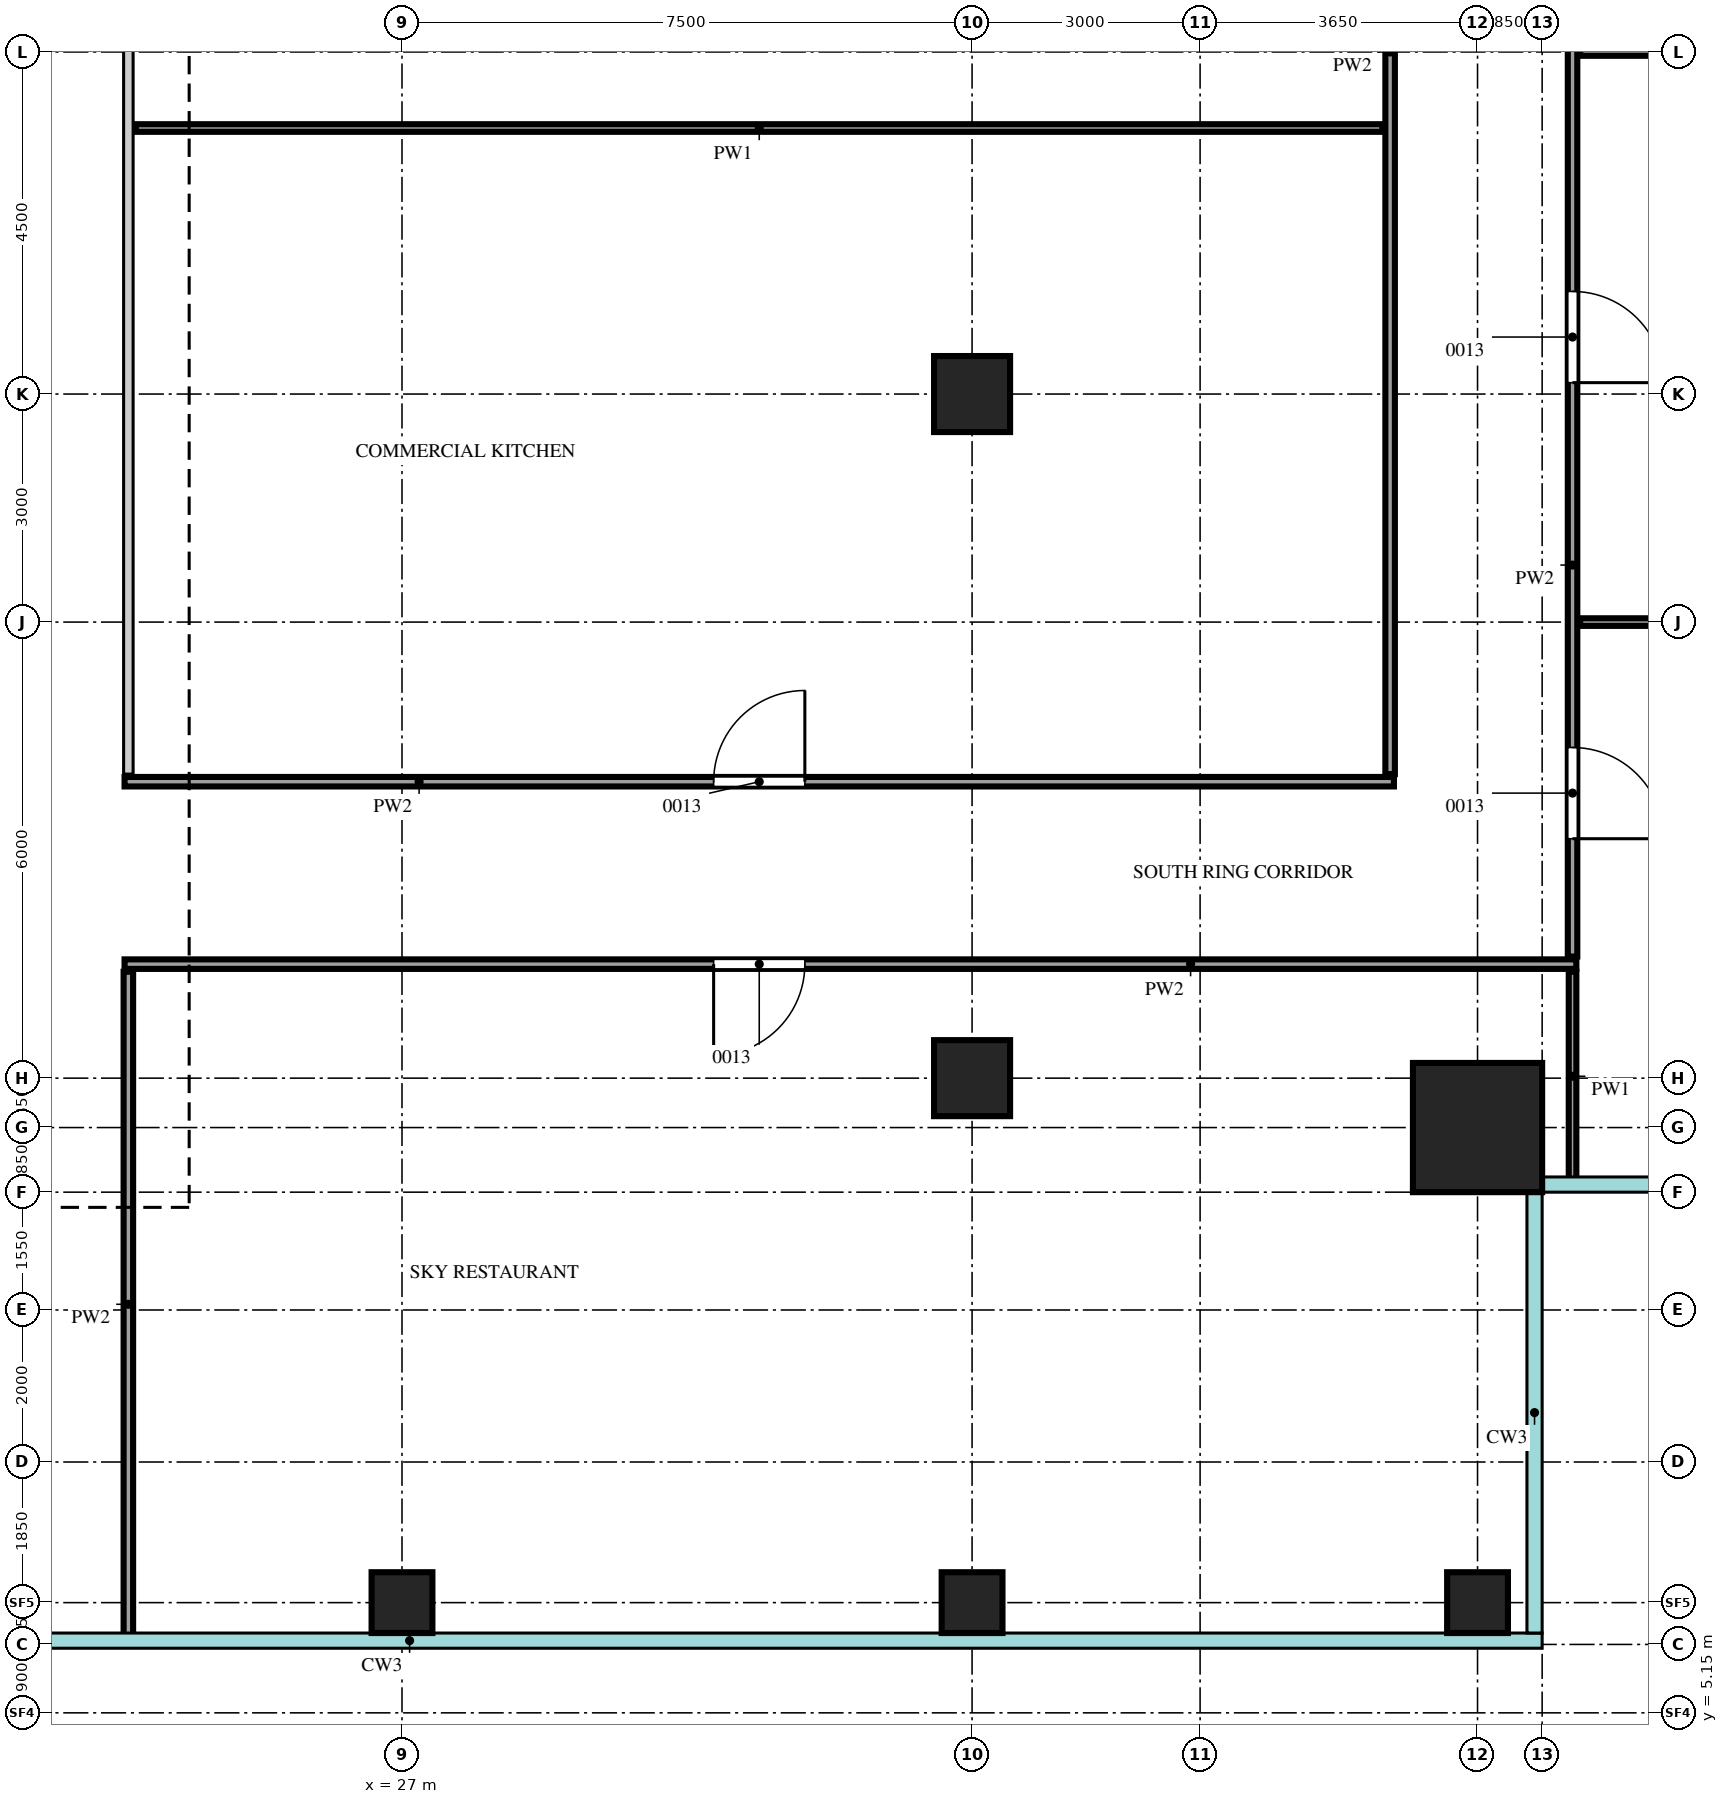
"""IFC4 building model, lengths in metres.
Left out: names, types, materials, properties, quantities, classifications, styles, units other than length and angle.
Written with IfcOpenShell. Run it as: python <this file> out.ifc"""

import sys

from ifc_helpers import new_model, si_unit, direction, frame, frame_2d, origin, origin_2d, place, context, subcontext, project, spatial, rectangle, extrude, source, transform, mapped, element, fill, save


model = new_model("IFC4")
c1 = context("Model", 3, precision=1e-05, world=origin(), true_north=direction((0.0, 1.0)))
c2 = subcontext(c1, "Body", "Model", "MODEL_VIEW")
j1 = project(units=[si_unit("LENGTHUNIT", "METRE"), si_unit("PLANEANGLEUNIT", "RADIAN")], contexts=[c1])
p1 = place(None, origin())
s1 = spatial("IfcSite", under=j1, at=p1, CompositionType="ELEMENT")
p2 = place(p1, origin())
s2 = spatial("IfcBuilding", under=s1, at=p2, CompositionType="ELEMENT")
p3 = place(p2, frame((0.0, 0.0, 314.2)))
s3 = spatial("IfcBuildingStorey", under=s2, at=p3, CompositionType="ELEMENT", Elevation=314.2)
m1 = source(origin(), c2, "Body", "SweptSolid", [
    extrude(rectangle(XDim=1.7, YDim=1.7, at=origin_2d()), origin(), (0.0, 0.0, 1.0), 3.75),
])
p4 = place(p3, frame((41.15, 12.85, 0.0), z_axis=(0.0, 0.0, 1.0), x_axis=(1.0, 0.0, 0.0)))
e1 = element("IfcColumn", 1, at=p4, inside=s3, PredefinedType="COLUMN", context=c2, shape_type="MappedRepresentation", body=[
    mapped(m1, transform((0.0, 0.0, 0.0))),
])
m2 = source(origin(), c2, "Body", "SweptSolid", [
    extrude(rectangle(XDim=0.8, YDim=0.8, at=origin_2d()), origin(), (0.0, 0.0, 1.0), 3.75),
])
for number, where, z_axis, x_axis in (
    (2, (27.0, 6.6, 0.0), (0.0, 0.0, 1.0), (1.0, 0.0, 0.0)),
    (3, (34.5, 6.6, 0.0), (0.0, 0.0, 1.0), (1.0, 0.0, 0.0)),
    (4, (41.15, 6.6, 0.0), (0.0, 0.0, 1.0), (1.0, 0.0, 0.0)),
):
    element("IfcColumn", number, at=place(p3, frame(where, z_axis=z_axis, x_axis=x_axis)), inside=s3, PredefinedType="COLUMN", context=c2, shape_type="MappedRepresentation", body=[
        mapped(m2, transform((0.0, 0.0, 0.0))),
    ])
m3 = source(origin(), c2, "Body", "SweptSolid", [
    extrude(rectangle(XDim=1.0, YDim=1.0, at=origin_2d()), origin(), (0.0, 0.0, 1.0), 3.75),
])
for number, where, z_axis, x_axis in (
    (5, (34.5, 13.5, 0.0), (0.0, 0.0, 1.0), (1.0, 0.0, 0.0)),
    (6, (34.5, 22.5, 0.0), (0.0, 0.0, 1.0), (1.0, 0.0, 0.0)),
):
    element("IfcColumn", number, at=place(p3, frame(where, z_axis=z_axis, x_axis=x_axis)), inside=s3, PredefinedType="COLUMN", context=c2, shape_type="MappedRepresentation", body=[
        mapped(m3, transform((0.0, 0.0, 0.0))),
    ])
m4 = source(origin(), c2, "Body", "SweptSolid", [
    extrude(rectangle(XDim=8.75, YDim=0.125, at=frame_2d((4.375, 0.0))), origin(), (0.0, 0.0, 1.0), 3.8),
])
p5 = place(p3, frame((23.4, 6.15, 0.0), z_axis=(0.0, 0.0, 1.0), x_axis=(0.0, 1.0, 0.0)))
e7 = element("IfcWall", 7, at=p5, inside=s3, PredefinedType="PARTITIONING", context=c2, shape_type="MappedRepresentation", body=[
    mapped(m4, transform((0.0, 0.0, 0.0))),
])
m5 = source(origin(), c2, "Body", "SweptSolid", [
    extrude(rectangle(XDim=2.75, YDim=0.1, at=frame_2d((1.375, 0.0))), origin(), (0.0, 0.0, 1.0), 3.8),
])
p6 = place(p3, frame((42.4, 12.15, 0.0), z_axis=(0.0, 0.0, 1.0), x_axis=(0.0, 1.0, 0.0)))
e8 = element("IfcWall", 8, at=p6, inside=s3, PredefinedType="PARTITIONING", context=c2, shape_type="MappedRepresentation", body=[
    mapped(m5, transform((0.0, 0.0, 0.0))),
])
m6 = source(origin(), c2, "Body", "SweptSolid", [
    extrude(rectangle(XDim=19.1, YDim=0.125, at=frame_2d((9.55, 0.0))), origin(), (0.0, 0.0, 1.0), 3.8),
])
p7 = place(p3, frame((23.35, 15.0, 0.0), z_axis=(0.0, 0.0, 1.0), x_axis=(1.0, 0.0, 0.0)))
e9 = element("IfcWall", 9, at=p7, inside=s3, PredefinedType="PARTITIONING", context=c2, shape_type="MappedRepresentation", body=[
    mapped(m6, transform((0.0, 0.0, 0.0))),
])
m7 = source(origin(), c2, "Body", "SweptSolid", [
    extrude(rectangle(XDim=1.2, YDim=2.1, at=frame_2d((0.6, 1.05))), frame((0.0, 0.073, 0.0), z_axis=(0.0, -1.0, 0.0), x_axis=(1.0, 0.0, 0.0)), (0.0, 0.0, 1.0), 0.145),
])
p8 = place(p7, frame((7.75, 0.0, 0.0)))
e10 = element("IfcOpeningElement", 10, at=p8, cuts=e9, PredefinedType="OPENING", context=c2, shape_type="MappedRepresentation", body=[
    mapped(m7, transform((0.0, 0.0, 0.0))),
])
m8 = source(origin(), c2, "Body", "SweptSolid", [
    extrude(rectangle(XDim=23.8, YDim=0.125, at=frame_2d((11.9, 0.0))), origin(), (0.0, 0.0, 1.0), 3.8),
])
p9 = place(p3, frame((42.4, 15.1, 0.0), z_axis=(0.0, 0.0, 1.0), x_axis=(0.0, 1.0, 0.0)))
e11 = element("IfcWall", 11, at=p9, inside=s3, PredefinedType="PARTITIONING", context=c2, shape_type="MappedRepresentation", body=[
    mapped(m8, transform((0.0, 0.0, 0.0))),
])
p10 = place(p9, frame((1.55, 0.0, 0.0)))
e12 = element("IfcOpeningElement", 12, at=p10, cuts=e11, PredefinedType="OPENING", context=c2, shape_type="MappedRepresentation", body=[
    mapped(m7, transform((0.0, 0.0, 0.0))),
])
p11 = place(p9, frame((7.55, 0.0, 0.0)))
e13 = element("IfcOpeningElement", 13, at=p11, cuts=e11, PredefinedType="OPENING", context=c2, shape_type="MappedRepresentation", body=[
    mapped(m7, transform((0.0, 0.0, 0.0))),
])
m9 = source(origin(), c2, "Body", "SweptSolid", [
    extrude(rectangle(XDim=0.9, YDim=2.1, at=frame_2d((0.45, 1.05))), frame((0.0, 0.073, 0.0), z_axis=(0.0, -1.0, 0.0), x_axis=(1.0, 0.0, 0.0)), (0.0, 0.0, 1.0), 0.145),
])
p12 = place(p9, frame((13.3, 0.0, 0.0)))
e14 = element("IfcOpeningElement", 14, at=p12, cuts=e11, PredefinedType="OPENING", context=c2, shape_type="MappedRepresentation", body=[
    mapped(m9, transform((0.0, 0.0, 0.0))),
])
p13 = place(p9, frame((17.35, 0.0, 0.0)))
e15 = element("IfcOpeningElement", 15, at=p13, cuts=e11, PredefinedType="OPENING", context=c2, shape_type="MappedRepresentation", body=[
    mapped(m9, transform((0.0, 0.0, 0.0))),
])
m10 = source(origin(), c2, "Body", "SweptSolid", [
    extrude(rectangle(XDim=1.0, YDim=2.1, at=frame_2d((0.5, 1.05))), frame((0.0, 0.073, 0.0), z_axis=(0.0, -1.0, 0.0), x_axis=(1.0, 0.0, 0.0)), (0.0, 0.0, 1.0), 0.145),
])
p14 = place(p9, frame((21.15, 0.0, 0.0)))
e16 = element("IfcOpeningElement", 16, at=p14, cuts=e11, PredefinedType="OPENING", context=c2, shape_type="MappedRepresentation", body=[
    mapped(m10, transform((0.0, 0.0, 0.0))),
])
m11 = source(origin(), c2, "Body", "SweptSolid", [
    extrude(rectangle(XDim=16.7, YDim=0.125, at=frame_2d((8.35, 0.0))), origin(), (0.0, 0.0, 1.0), 3.8),
])
p15 = place(p3, frame((23.35, 17.4, 0.0), z_axis=(0.0, 0.0, 1.0), x_axis=(1.0, 0.0, 0.0)))
e17 = element("IfcWall", 17, at=p15, inside=s3, PredefinedType="PARTITIONING", context=c2, shape_type="MappedRepresentation", body=[
    mapped(m11, transform((0.0, 0.0, 0.0))),
])
p16 = place(p15, frame((7.75, 0.0, 0.0)))
e18 = element("IfcOpeningElement", 18, at=p16, cuts=e17, PredefinedType="OPENING", context=c2, shape_type="MappedRepresentation", body=[
    mapped(m7, transform((0.0, 0.0, 0.0))),
])
m12 = source(origin(), c2, "Body", "SweptSolid", [
    extrude(rectangle(XDim=19.0, YDim=0.125, at=frame_2d((9.5, 0.0))), origin(), (0.0, 0.0, 1.0), 3.8),
])
p17 = place(p3, frame((23.4, 17.5, 0.0), z_axis=(0.0, 0.0, 1.0), x_axis=(0.0, 1.0, 0.0)))
e19 = element("IfcWall", 19, at=p17, inside=s3, PredefinedType="PARTITIONING", context=c2, shape_type="MappedRepresentation", body=[
    mapped(m12, transform((0.0, 0.0, 0.0))),
])
p18 = place(p17, frame((10.4, 0.0, 0.0)))
e20 = element("IfcOpeningElement", 20, at=p18, cuts=e19, PredefinedType="OPENING", context=c2, shape_type="MappedRepresentation", body=[
    mapped(m9, transform((0.0, 0.0, 0.0))),
])
p19 = place(p3, frame((40.0, 17.5, 0.0), z_axis=(0.0, 0.0, 1.0), x_axis=(0.0, 1.0, 0.0)))
e21 = element("IfcWall", 21, at=p19, inside=s3, PredefinedType="PARTITIONING", context=c2, shape_type="MappedRepresentation", body=[
    mapped(m12, transform((0.0, 0.0, 0.0))),
])
m13 = source(origin(), c2, "Body", "SweptSolid", [
    extrude(rectangle(XDim=5.35, YDim=0.1, at=frame_2d((2.675, 0.0))), origin(), (0.0, 0.0, 1.0), 3.8),
])
p20 = place(p3, frame((42.5, 19.5, 0.0), z_axis=(0.0, 0.0, 1.0), x_axis=(1.0, 0.0, 0.0)))
e22 = element("IfcWall", 22, at=p20, inside=s3, PredefinedType="PARTITIONING", context=c2, shape_type="MappedRepresentation", body=[
    mapped(m13, transform((0.0, 0.0, 0.0))),
])
m14 = source(origin(), c2, "Body", "SweptSolid", [
    extrude(rectangle(XDim=16.4, YDim=0.1, at=frame_2d((8.2, 0.0))), origin(), (0.0, 0.0, 1.0), 3.8),
])
p21 = place(p3, frame((23.5, 26.0, 0.0), z_axis=(0.0, 0.0, 1.0), x_axis=(1.0, 0.0, 0.0)))
e23 = element("IfcWall", 23, at=p21, inside=s3, PredefinedType="PARTITIONING", context=c2, shape_type="MappedRepresentation", body=[
    mapped(m14, transform((0.0, 0.0, 0.0))),
])
p22 = place(p3, frame((42.5, 27.0, 0.0), z_axis=(0.0, 0.0, 1.0), x_axis=(1.0, 0.0, 0.0)))
e24 = element("IfcWall", 24, at=p22, inside=s3, PredefinedType="PARTITIONING", context=c2, shape_type="MappedRepresentation", body=[
    mapped(m13, transform((0.0, 0.0, 0.0))),
])
m15 = source(origin(), c2, "Body", "SweptSolid", [
    extrude(rectangle(XDim=1.2, YDim=2.1, at=frame_2d((0.6, 1.05))), frame((0.0, 0.025, 0.0), z_axis=(0.0, -1.0, 0.0), x_axis=(1.0, 0.0, 0.0)), (0.0, 0.0, 1.0), 0.05),
])
p23 = place(p8, origin())
e25 = element("IfcDoor", 25, at=p23, inside=s3, OperationType="SINGLE_SWING_LEFT", PredefinedType="DOOR", context=c2, shape_type="MappedRepresentation", body=[
    mapped(m15, transform((0.0, 0.0, 0.0))),
])
fill(e10, e25)
p24 = place(p10, origin())
e26 = element("IfcDoor", 26, at=p24, inside=s3, OperationType="SINGLE_SWING_LEFT", PredefinedType="DOOR", context=c2, shape_type="MappedRepresentation", body=[
    mapped(m15, transform((0.0, 0.0, 0.0))),
])
fill(e12, e26)
p25 = place(p11, origin())
e27 = element("IfcDoor", 27, at=p25, inside=s3, OperationType="SINGLE_SWING_LEFT", PredefinedType="DOOR", context=c2, shape_type="MappedRepresentation", body=[
    mapped(m15, transform((0.0, 0.0, 0.0))),
])
fill(e13, e27)
p26 = place(p16, origin())
e28 = element("IfcDoor", 28, at=p26, inside=s3, OperationType="SINGLE_SWING_LEFT", PredefinedType="DOOR", context=c2, shape_type="MappedRepresentation", body=[
    mapped(m15, transform((0.0, 0.0, 0.0))),
])
fill(e18, e28)
save(model, sys.argv[1])
